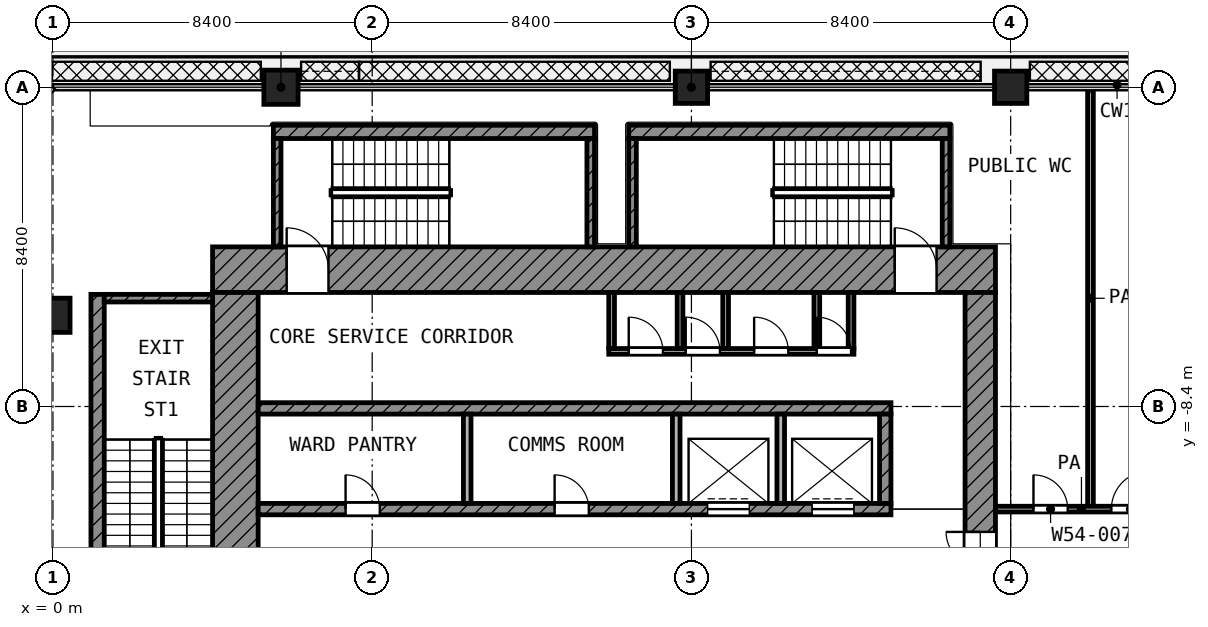
"""IFC4 building model, lengths in metres.
Left out: names, types, materials, properties, quantities, classifications, styles, units other than length and angle.
Written with IfcOpenShell. Run it as: python <this file> out.ifc"""

import sys

from ifc_helpers import new_model, si_unit, direction, frame, frame_2d, origin, origin_2d, place, context, subcontext, project, spatial, rectangle, extrude, element, fill, save


model = new_model("IFC4")
c1 = context("Model", 3, precision=1e-05, world=origin(), true_north=direction((0.0, 1.0)))
c2 = subcontext(c1, "Body", "Model", "MODEL_VIEW")
j1 = project(units=[si_unit("LENGTHUNIT", "METRE"), si_unit("PLANEANGLEUNIT", "RADIAN")], contexts=[c1])
p1 = place(None, origin())
s1 = spatial("IfcSite", under=j1, at=p1, CompositionType="ELEMENT")
p2 = place(p1, origin())
s2 = spatial("IfcBuilding", under=s1, at=p2, CompositionType="ELEMENT")
p3 = place(p2, frame((0.0, 0.0, 234.8)))
s3 = spatial("IfcBuildingStorey", under=s2, at=p3, CompositionType="ELEMENT", Elevation=234.8)
p4 = place(p3, frame((6.0, 0.0, 0.0), z_axis=(0.0, 0.0, 1.0), x_axis=(1.0, 0.0, 0.0)))
e1 = element("IfcColumn", 1, at=p4, inside=s3, PredefinedType="COLUMN", context=c2, shape_type="SweptSolid", body=[
    extrude(rectangle(XDim=0.9, YDim=0.9, at=origin_2d()), origin(), (0.0, 0.0, 1.0), 4.2),
])
for number, where, z_axis, x_axis in (
    (2, (16.8, 0.0, 0.0), (0.0, 0.0, 1.0), (1.0, 0.0, 0.0)),
    (3, (25.2, 0.0, 0.0), (0.0, 0.0, 1.0), (1.0, 0.0, 0.0)),
):
    element("IfcColumn", number, at=place(p3, frame(where, z_axis=z_axis, x_axis=x_axis)), inside=s3, PredefinedType="COLUMN", context=c2, shape_type="SweptSolid", body=[
        extrude(rectangle(XDim=0.85, YDim=0.85, at=origin_2d()), origin(), (0.0, 0.0, 1.0), 4.2),
    ])
p5 = place(p3, frame((0.0, -6.0, 0.0), z_axis=(0.0, 0.0, 1.0), x_axis=(1.0, 0.0, 0.0)))
e4 = element("IfcColumn", 4, at=p5, inside=s3, PredefinedType="COLUMN", context=c2, shape_type="SweptSolid", body=[
    extrude(rectangle(XDim=0.9, YDim=0.9, at=origin_2d()), origin(), (0.0, 0.0, 1.0), 4.2),
])
p6 = place(p3, frame((4.2, -4.8, 0.0), z_axis=(0.0, 0.0, 1.0), x_axis=(1.0, 0.0, 0.0)))
e5 = element("IfcWall", 5, at=p6, inside=s3, PredefinedType="SHEAR", context=c2, shape_type="SweptSolid", body=[
    extrude(rectangle(XDim=20.6, YDim=1.2, at=frame_2d((10.3, 0.0))), origin(), (0.0, 0.0, 1.0), 3.6),
])
p7 = place(p6, frame((1.95, 0.0, 0.0)))
e6 = element("IfcOpeningElement", 6, at=p7, cuts=e5, PredefinedType="OPENING", context=c2, shape_type="SweptSolid", body=[
    extrude(rectangle(XDim=1.1, YDim=2.1, at=frame_2d((0.55, 1.05))), frame((0.0, 0.61, 0.0), z_axis=(0.0, -1.0, 0.0), x_axis=(1.0, 0.0, 0.0)), (0.0, 0.0, 1.0), 1.22),
])
p8 = place(p6, frame((17.95, 0.0, 0.0)))
e7 = element("IfcOpeningElement", 7, at=p8, cuts=e5, PredefinedType="OPENING", context=c2, shape_type="SweptSolid", body=[
    extrude(rectangle(XDim=1.1, YDim=2.1, at=frame_2d((0.55, 1.05))), frame((0.0, 0.61, 0.0), z_axis=(0.0, -1.0, 0.0), x_axis=(1.0, 0.0, 0.0)), (0.0, 0.0, 1.0), 1.22),
])
p9 = place(p3, frame((4.8, -24.8, 0.0), z_axis=(0.0, 0.0, 1.0), x_axis=(0.0, 1.0, 0.0)))
e8 = element("IfcWall", 8, at=p9, inside=s3, PredefinedType="SHEAR", context=c2, shape_type="SweptSolid", body=[
    extrude(rectangle(XDim=19.4, YDim=1.2, at=frame_2d((9.7, 0.0))), origin(), (0.0, 0.0, 1.0), 3.6),
])
p10 = place(p9, frame((11.25, 0.0, 0.0)))
e9 = element("IfcOpeningElement", 9, at=p10, cuts=e8, PredefinedType="OPENING", context=c2, shape_type="SweptSolid", body=[
    extrude(rectangle(XDim=1.1, YDim=2.1, at=frame_2d((0.55, 1.05))), frame((0.0, 0.61, 0.0), z_axis=(0.0, -1.0, 0.0), x_axis=(1.0, 0.0, 0.0)), (0.0, 0.0, 1.0), 1.22),
])
p11 = place(p9, frame((1.95, 0.0, 0.0)))
e10 = element("IfcOpeningElement", 10, at=p11, cuts=e8, PredefinedType="OPENING", context=c2, shape_type="SweptSolid", body=[
    extrude(rectangle(XDim=1.1, YDim=2.1, at=frame_2d((0.55, 1.05))), frame((0.0, 0.61, 0.0), z_axis=(0.0, -1.0, 0.0), x_axis=(1.0, 0.0, 0.0)), (0.0, 0.0, 1.0), 1.22),
])
p12 = place(p3, frame((24.4, -24.0, 0.0), z_axis=(0.0, 0.0, 1.0), x_axis=(0.0, 1.0, 0.0)))
e11 = element("IfcWall", 11, at=p12, inside=s3, PredefinedType="SHEAR", context=c2, shape_type="SweptSolid", body=[
    extrude(rectangle(XDim=18.6, YDim=0.8, at=frame_2d((9.3, 0.0))), origin(), (0.0, 0.0, 1.0), 3.6),
])
p13 = place(p12, frame((10.5, 0.0, 0.0)))
e12 = element("IfcOpeningElement", 12, at=p13, cuts=e11, PredefinedType="OPENING", context=c2, shape_type="SweptSolid", body=[
    extrude(rectangle(XDim=1.8, YDim=2.1, at=frame_2d((0.9, 1.05))), frame((0.0, 0.41, 0.0), z_axis=(0.0, -1.0, 0.0), x_axis=(1.0, 0.0, 0.0)), (0.0, 0.0, 1.0), 0.82),
])
p14 = place(p3, frame((5.4, -8.45, 0.0), z_axis=(0.0, 0.0, 1.0), x_axis=(1.0, 0.0, 0.0)))
e13 = element("IfcWall", 13, at=p14, inside=s3, PredefinedType="SHEAR", context=c2, shape_type="SweptSolid", body=[
    extrude(rectangle(XDim=16.65, YDim=0.3, at=frame_2d((8.325, 0.0))), origin(), (0.0, 0.0, 1.0), 3.6),
])
p15 = place(p3, frame((5.4, -11.1, 0.0), z_axis=(0.0, 0.0, 1.0), x_axis=(1.0, 0.0, 0.0)))
e14 = element("IfcWall", 14, at=p15, inside=s3, PredefinedType="SHEAR", context=c2, shape_type="SweptSolid", body=[
    extrude(rectangle(XDim=16.65, YDim=0.3, at=frame_2d((8.325, 0.0))), origin(), (0.0, 0.0, 1.0), 3.6),
])
p16 = place(p15, frame((11.825, 0.0, 0.0)))
e15 = element("IfcOpeningElement", 15, at=p16, cuts=e14, PredefinedType="OPENING", context=c2, shape_type="SweptSolid", body=[
    extrude(rectangle(XDim=1.1, YDim=2.1, at=frame_2d((0.55, 1.05))), frame((0.0, 0.16, 0.0), z_axis=(0.0, -1.0, 0.0), x_axis=(1.0, 0.0, 0.0)), (0.0, 0.0, 1.0), 0.32),
])
p17 = place(p15, frame((14.575, 0.0, 0.0)))
e16 = element("IfcOpeningElement", 16, at=p17, cuts=e14, PredefinedType="OPENING", context=c2, shape_type="SweptSolid", body=[
    extrude(rectangle(XDim=1.1, YDim=2.1, at=frame_2d((0.55, 1.05))), frame((0.0, 0.16, 0.0), z_axis=(0.0, -1.0, 0.0), x_axis=(1.0, 0.0, 0.0)), (0.0, 0.0, 1.0), 0.32),
])
p18 = place(p15, frame((2.3, 0.0, 0.0)))
e17 = element("IfcOpeningElement", 17, at=p18, cuts=e14, PredefinedType="OPENING", context=c2, shape_type="SweptSolid", body=[
    extrude(rectangle(XDim=0.9, YDim=2.1, at=frame_2d((0.45, 1.05))), frame((0.0, 0.16, 0.0), z_axis=(0.0, -1.0, 0.0), x_axis=(1.0, 0.0, 0.0)), (0.0, 0.0, 1.0), 0.32),
])
p19 = place(p15, frame((7.8, 0.0, 0.0)))
e18 = element("IfcOpeningElement", 18, at=p19, cuts=e14, PredefinedType="OPENING", context=c2, shape_type="SweptSolid", body=[
    extrude(rectangle(XDim=0.9, YDim=2.1, at=frame_2d((0.45, 1.05))), frame((0.0, 0.16, 0.0), z_axis=(0.0, -1.0, 0.0), x_axis=(1.0, 0.0, 0.0)), (0.0, 0.0, 1.0), 0.32),
])
p20 = place(p3, frame((21.9, -10.95, 0.0), z_axis=(0.0, 0.0, 1.0), x_axis=(0.0, 1.0, 0.0)))
e19 = element("IfcWall", 19, at=p20, inside=s3, PredefinedType="SHEAR", context=c2, shape_type="SweptSolid", body=[
    extrude(rectangle(XDim=2.35, YDim=0.3, at=frame_2d((1.175, 0.0))), origin(), (0.0, 0.0, 1.0), 3.6),
])
for number, where, z_axis, x_axis in (
    (20, (10.9, -10.95, 0.0), (0.0, 0.0, 1.0), (0.0, 1.0, 0.0)),
    (21, (16.4, -10.95, 0.0), (0.0, 0.0, 1.0), (0.0, 1.0, 0.0)),
    (22, (19.15, -10.95, 0.0), (0.0, 0.0, 1.0), (0.0, 1.0, 0.0)),
):
    element("IfcWall", number, at=place(p3, frame(where, z_axis=z_axis, x_axis=x_axis)), inside=s3, PredefinedType="PARTITIONING", context=c2, shape_type="SweptSolid", body=[
        extrude(rectangle(XDim=2.35, YDim=0.2, at=frame_2d((1.175, 0.0))), origin(), (0.0, 0.0, 1.0), 3.6),
    ])
p21 = place(p3, frame((14.625, -6.95, 0.0), z_axis=(0.0, 0.0, 1.0), x_axis=(1.0, 0.0, 0.0)))
e23 = element("IfcWall", 23, at=p21, inside=s3, PredefinedType="PARTITIONING", context=c2, shape_type="SweptSolid", body=[
    extrude(rectangle(XDim=6.45, YDim=0.15, at=frame_2d((3.225, 0.0))), origin(), (0.0, 0.0, 1.0), 3.6),
])
p22 = place(p21, frame((0.525, 0.0, 0.0)))
e24 = element("IfcOpeningElement", 24, at=p22, cuts=e23, PredefinedType="OPENING", context=c2, shape_type="SweptSolid", body=[
    extrude(rectangle(XDim=0.9, YDim=2.1, at=frame_2d((0.45, 1.05))), frame((0.0, 0.085, 0.0), z_axis=(0.0, -1.0, 0.0), x_axis=(1.0, 0.0, 0.0)), (0.0, 0.0, 1.0), 0.17),
])
p23 = place(p21, frame((2.025, 0.0, 0.0)))
e25 = element("IfcOpeningElement", 25, at=p23, cuts=e23, PredefinedType="OPENING", context=c2, shape_type="SweptSolid", body=[
    extrude(rectangle(XDim=0.9, YDim=2.1, at=frame_2d((0.45, 1.05))), frame((0.0, 0.085, 0.0), z_axis=(0.0, -1.0, 0.0), x_axis=(1.0, 0.0, 0.0)), (0.0, 0.0, 1.0), 0.17),
])
p24 = place(p21, frame((3.825, 0.0, 0.0)))
e26 = element("IfcOpeningElement", 26, at=p24, cuts=e23, PredefinedType="OPENING", context=c2, shape_type="SweptSolid", body=[
    extrude(rectangle(XDim=0.9, YDim=2.1, at=frame_2d((0.45, 1.05))), frame((0.0, 0.085, 0.0), z_axis=(0.0, -1.0, 0.0), x_axis=(1.0, 0.0, 0.0)), (0.0, 0.0, 1.0), 0.17),
])
p25 = place(p21, frame((5.475, 0.0, 0.0)))
e27 = element("IfcOpeningElement", 27, at=p25, cuts=e23, PredefinedType="OPENING", context=c2, shape_type="SweptSolid", body=[
    extrude(rectangle(XDim=0.9, YDim=2.1, at=frame_2d((0.45, 1.05))), frame((0.0, 0.085, 0.0), z_axis=(0.0, -1.0, 0.0), x_axis=(1.0, 0.0, 0.0)), (0.0, 0.0, 1.0), 0.17),
])
for number, where, z_axis, x_axis in (
    (28, (14.7, -6.875, 0.0), (0.0, 0.0, 1.0), (0.0, 1.0, 0.0)),
    (29, (16.5, -6.875, 0.0), (0.0, 0.0, 1.0), (0.0, 1.0, 0.0)),
    (30, (17.7, -6.875, 0.0), (0.0, 0.0, 1.0), (0.0, 1.0, 0.0)),
    (31, (20.1, -6.875, 0.0), (0.0, 0.0, 1.0), (0.0, 1.0, 0.0)),
    (32, (21.0, -6.875, 0.0), (0.0, 0.0, 1.0), (0.0, 1.0, 0.0)),
):
    element("IfcWall", number, at=place(p3, frame(where, z_axis=z_axis, x_axis=x_axis)), inside=s3, PredefinedType="PARTITIONING", context=c2, shape_type="SweptSolid", body=[
        extrude(rectangle(XDim=1.475, YDim=0.15, at=frame_2d((0.738, 0.0))), origin(), (0.0, 0.0, 1.0), 3.6),
    ])
p26 = place(p3, frame((1.175, -13.9, 0.0), z_axis=(0.0, 0.0, 1.0), x_axis=(0.0, 1.0, 0.0)))
e33 = element("IfcWall", 33, at=p26, inside=s3, PredefinedType="SHEAR", context=c2, shape_type="SweptSolid", body=[
    extrude(rectangle(XDim=8.45, YDim=0.35, at=frame_2d((4.225, 0.0))), origin(), (0.0, 0.0, 1.0), 3.6),
])
p27 = place(p3, frame((1.35, -5.55, 0.0), z_axis=(0.0, 0.0, 1.0), x_axis=(1.0, 0.0, 0.0)))
e34 = element("IfcWall", 34, at=p27, inside=s3, PredefinedType="SHEAR", context=c2, shape_type="SweptSolid", body=[
    extrude(rectangle(XDim=2.85, YDim=0.2, at=frame_2d((1.425, 0.0))), origin(), (0.0, 0.0, 1.0), 3.6),
])
p28 = place(p3, frame((5.8, -1.175, 0.0), z_axis=(0.0, 0.0, 1.0), x_axis=(1.0, 0.0, 0.0)))
e35 = element("IfcWall", 35, at=p28, inside=s3, PredefinedType="SHEAR", context=c2, shape_type="SweptSolid", body=[
    extrude(rectangle(XDim=8.45, YDim=0.35, at=frame_2d((4.225, 0.0))), origin(), (0.0, 0.0, 1.0), 3.6),
])
for number, where, z_axis, x_axis in (
    (36, (5.9, -4.2, 0.0), (0.0, 0.0, 1.0), (0.0, 1.0, 0.0)),
    (37, (14.15, -4.2, 0.0), (0.0, 0.0, 1.0), (0.0, 1.0, 0.0)),
):
    element("IfcWall", number, at=place(p3, frame(where, z_axis=z_axis, x_axis=x_axis)), inside=s3, PredefinedType="SHEAR", context=c2, shape_type="SweptSolid", body=[
        extrude(rectangle(XDim=2.85, YDim=0.2, at=frame_2d((1.425, 0.0))), origin(), (0.0, 0.0, 1.0), 3.6),
    ])
p29 = place(p3, frame((15.15, -1.175, 0.0), z_axis=(0.0, 0.0, 1.0), x_axis=(1.0, 0.0, 0.0)))
e38 = element("IfcWall", 38, at=p29, inside=s3, PredefinedType="SHEAR", context=c2, shape_type="SweptSolid", body=[
    extrude(rectangle(XDim=8.45, YDim=0.35, at=frame_2d((4.225, 0.0))), origin(), (0.0, 0.0, 1.0), 3.6),
])
for number, where, z_axis, x_axis in (
    (39, (15.25, -4.2, 0.0), (0.0, 0.0, 1.0), (0.0, 1.0, 0.0)),
    (40, (23.5, -4.2, 0.0), (0.0, 0.0, 1.0), (0.0, 1.0, 0.0)),
):
    element("IfcWall", number, at=place(p3, frame(where, z_axis=z_axis, x_axis=x_axis)), inside=s3, PredefinedType="SHEAR", context=c2, shape_type="SweptSolid", body=[
        extrude(rectangle(XDim=2.85, YDim=0.2, at=frame_2d((1.425, 0.0))), origin(), (0.0, 0.0, 1.0), 3.6),
    ])
p30 = place(p3, frame((24.8, -11.1, 0.0), z_axis=(0.0, 0.0, 1.0), x_axis=(1.0, 0.0, 0.0)))
e41 = element("IfcWall", 41, at=p30, inside=s3, PredefinedType="PARTITIONING", context=c2, shape_type="SweptSolid", body=[
    extrude(rectangle(XDim=4.525, YDim=0.15, at=frame_2d((2.262, 0.0))), origin(), (0.0, 0.0, 1.0), 3.6),
])
p31 = place(p30, frame((1.0, 0.0, 0.0)))
e42 = element("IfcOpeningElement", 42, at=p31, cuts=e41, PredefinedType="OPENING", context=c2, shape_type="SweptSolid", body=[
    extrude(rectangle(XDim=0.9, YDim=2.1, at=frame_2d((0.45, 1.05))), frame((0.0, 0.085, 0.0), z_axis=(0.0, -1.0, 0.0), x_axis=(1.0, 0.0, 0.0)), (0.0, 0.0, 1.0), 0.17),
])
p32 = place(p30, frame((3.05, 0.0, 0.0)))
e43 = element("IfcOpeningElement", 43, at=p32, cuts=e41, PredefinedType="OPENING", context=c2, shape_type="SweptSolid", body=[
    extrude(rectangle(XDim=1.0, YDim=2.1, at=frame_2d((0.5, 1.05))), frame((0.0, 0.085, 0.0), z_axis=(0.0, -1.0, 0.0), x_axis=(1.0, 0.0, 0.0)), (0.0, 0.0, 1.0), 0.17),
])
p33 = place(p3, frame((27.3, -11.025, 0.0), z_axis=(0.0, 0.0, 1.0), x_axis=(0.0, 1.0, 0.0)))
e44 = element("IfcWall", 44, at=p33, inside=s3, PredefinedType="PARTITIONING", context=c2, shape_type="SweptSolid", body=[
    extrude(rectangle(XDim=10.945, YDim=0.15, at=frame_2d((5.472, 0.0))), origin(), (0.0, 0.0, 1.0), 3.6),
])
p34 = place(p16, origin())
e45 = element("IfcDoor", 45, at=p34, inside=s3, OperationType="DOUBLE_DOOR_SLIDING", PredefinedType="DOOR", context=c2, shape_type="SweptSolid", body=[
    extrude(rectangle(XDim=1.1, YDim=2.1, at=frame_2d((0.55, 1.05))), frame((0.0, 0.025, 0.0), z_axis=(0.0, -1.0, 0.0), x_axis=(1.0, 0.0, 0.0)), (0.0, 0.0, 1.0), 0.05),
])
fill(e15, e45)
p35 = place(p17, origin())
e46 = element("IfcDoor", 46, at=p35, inside=s3, OperationType="DOUBLE_DOOR_SLIDING", PredefinedType="DOOR", context=c2, shape_type="SweptSolid", body=[
    extrude(rectangle(XDim=1.1, YDim=2.1, at=frame_2d((0.55, 1.05))), frame((0.0, 0.025, 0.0), z_axis=(0.0, -1.0, 0.0), x_axis=(1.0, 0.0, 0.0)), (0.0, 0.0, 1.0), 0.05),
])
fill(e16, e46)
p36 = place(p7, origin())
e47 = element("IfcDoor", 47, at=p36, inside=s3, OperationType="SINGLE_SWING_LEFT", PredefinedType="DOOR", context=c2, shape_type="SweptSolid", body=[
    extrude(rectangle(XDim=1.1, YDim=2.1, at=frame_2d((0.55, 1.05))), frame((0.0, 0.025, 0.0), z_axis=(0.0, -1.0, 0.0), x_axis=(1.0, 0.0, 0.0)), (0.0, 0.0, 1.0), 0.05),
])
fill(e6, e47)
p37 = place(p8, origin())
e48 = element("IfcDoor", 48, at=p37, inside=s3, OperationType="SINGLE_SWING_LEFT", PredefinedType="DOOR", context=c2, shape_type="SweptSolid", body=[
    extrude(rectangle(XDim=1.1, YDim=2.1, at=frame_2d((0.55, 1.05))), frame((0.0, 0.025, 0.0), z_axis=(0.0, -1.0, 0.0), x_axis=(1.0, 0.0, 0.0)), (0.0, 0.0, 1.0), 0.05),
])
fill(e7, e48)
p38 = place(p13, origin())
e49 = element("IfcDoor", 49, at=p38, inside=s3, OperationType="DOUBLE_DOOR_SINGLE_SWING", PredefinedType="DOOR", context=c2, shape_type="SweptSolid", body=[
    extrude(rectangle(XDim=1.8, YDim=2.1, at=frame_2d((0.9, 1.05))), frame((0.0, 0.025, 0.0), z_axis=(0.0, -1.0, 0.0), x_axis=(1.0, 0.0, 0.0)), (0.0, 0.0, 1.0), 0.05),
])
fill(e12, e49)
p39 = place(p22, origin())
e50 = element("IfcDoor", 50, at=p39, inside=s3, OperationType="SINGLE_SWING_LEFT", PredefinedType="DOOR", context=c2, shape_type="SweptSolid", body=[
    extrude(rectangle(XDim=0.9, YDim=2.1, at=frame_2d((0.45, 1.05))), frame((0.0, 0.025, 0.0), z_axis=(0.0, -1.0, 0.0), x_axis=(1.0, 0.0, 0.0)), (0.0, 0.0, 1.0), 0.05),
])
fill(e24, e50)
p40 = place(p23, origin())
e51 = element("IfcDoor", 51, at=p40, inside=s3, OperationType="SINGLE_SWING_LEFT", PredefinedType="DOOR", context=c2, shape_type="SweptSolid", body=[
    extrude(rectangle(XDim=0.9, YDim=2.1, at=frame_2d((0.45, 1.05))), frame((0.0, 0.025, 0.0), z_axis=(0.0, -1.0, 0.0), x_axis=(1.0, 0.0, 0.0)), (0.0, 0.0, 1.0), 0.05),
])
fill(e25, e51)
p41 = place(p24, origin())
e52 = element("IfcDoor", 52, at=p41, inside=s3, OperationType="SINGLE_SWING_LEFT", PredefinedType="DOOR", context=c2, shape_type="SweptSolid", body=[
    extrude(rectangle(XDim=0.9, YDim=2.1, at=frame_2d((0.45, 1.05))), frame((0.0, 0.025, 0.0), z_axis=(0.0, -1.0, 0.0), x_axis=(1.0, 0.0, 0.0)), (0.0, 0.0, 1.0), 0.05),
])
fill(e26, e52)
p42 = place(p25, origin())
e53 = element("IfcDoor", 53, at=p42, inside=s3, OperationType="SINGLE_SWING_LEFT", PredefinedType="DOOR", context=c2, shape_type="SweptSolid", body=[
    extrude(rectangle(XDim=0.9, YDim=2.1, at=frame_2d((0.45, 1.05))), frame((0.0, 0.025, 0.0), z_axis=(0.0, -1.0, 0.0), x_axis=(1.0, 0.0, 0.0)), (0.0, 0.0, 1.0), 0.05),
])
fill(e27, e53)
p43 = place(p18, origin())
e54 = element("IfcDoor", 54, at=p43, inside=s3, OperationType="SINGLE_SWING_LEFT", PredefinedType="DOOR", context=c2, shape_type="SweptSolid", body=[
    extrude(rectangle(XDim=0.9, YDim=2.1, at=frame_2d((0.45, 1.05))), frame((0.0, 0.025, 0.0), z_axis=(0.0, -1.0, 0.0), x_axis=(1.0, 0.0, 0.0)), (0.0, 0.0, 1.0), 0.05),
])
fill(e17, e54)
p44 = place(p19, origin())
e55 = element("IfcDoor", 55, at=p44, inside=s3, OperationType="SINGLE_SWING_LEFT", PredefinedType="DOOR", context=c2, shape_type="SweptSolid", body=[
    extrude(rectangle(XDim=0.9, YDim=2.1, at=frame_2d((0.45, 1.05))), frame((0.0, 0.025, 0.0), z_axis=(0.0, -1.0, 0.0), x_axis=(1.0, 0.0, 0.0)), (0.0, 0.0, 1.0), 0.05),
])
fill(e18, e55)
p45 = place(p31, origin())
e56 = element("IfcDoor", 56, at=p45, inside=s3, OperationType="SINGLE_SWING_LEFT", PredefinedType="DOOR", context=c2, shape_type="SweptSolid", body=[
    extrude(rectangle(XDim=0.9, YDim=2.1, at=frame_2d((0.45, 1.05))), frame((0.0, 0.025, 0.0), z_axis=(0.0, -1.0, 0.0), x_axis=(1.0, 0.0, 0.0)), (0.0, 0.0, 1.0), 0.05),
])
fill(e42, e56)
p46 = place(p32, origin())
e57 = element("IfcDoor", 57, at=p46, inside=s3, OperationType="SINGLE_SWING_RIGHT", PredefinedType="DOOR", context=c2, shape_type="SweptSolid", body=[
    extrude(rectangle(XDim=1.0, YDim=2.1, at=frame_2d((0.5, 1.05))), frame((0.0, 0.025, 0.0), z_axis=(0.0, -1.0, 0.0), x_axis=(1.0, 0.0, 0.0)), (0.0, 0.0, 1.0), 0.05),
])
fill(e43, e57)
save(model, sys.argv[1])
